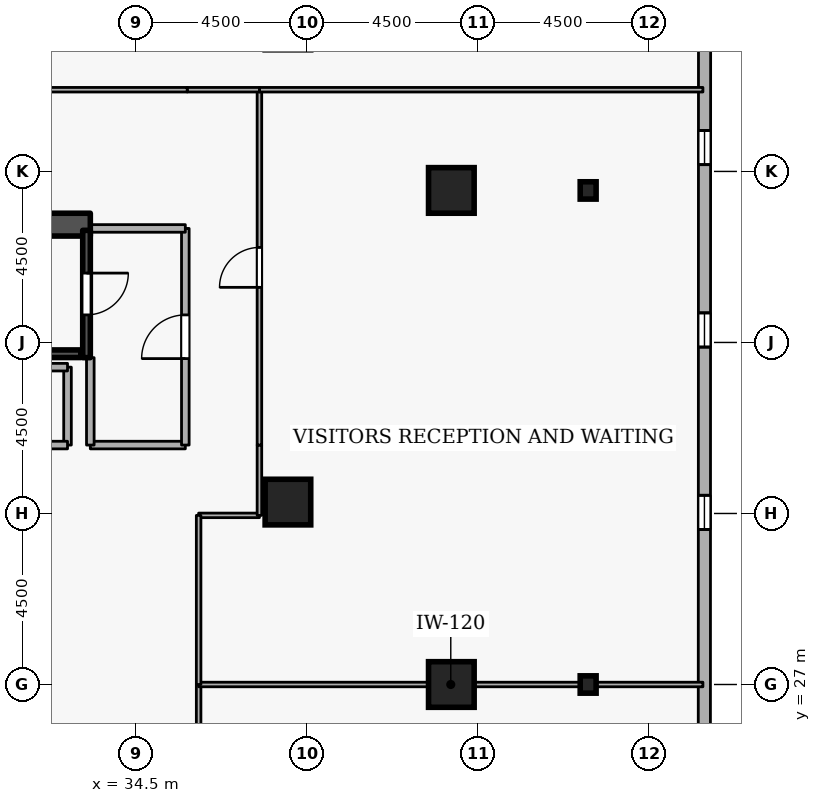
"""IFC4 building model, lengths in metres.
Left out: names, types, materials, properties, quantities, classifications, styles, units other than length and angle.
Written with IfcOpenShell. Run it as: python <this file> out.ifc"""

import sys

from ifc_helpers import new_model, si_unit, direction, frame, frame_2d, origin, origin_2d, place, context, subcontext, project, spatial, rectangle, i_section, extrude, element, fill, save


model = new_model("IFC4")
c1 = context("Model", 3, precision=1e-05, world=origin(), true_north=direction((0.0, 1.0)))
c2 = subcontext(c1, "Body", "Model", "MODEL_VIEW")
j1 = project(units=[si_unit("LENGTHUNIT", "METRE"), si_unit("PLANEANGLEUNIT", "RADIAN")], contexts=[c1])
p1 = place(None, origin())
s1 = spatial("IfcSite", under=j1, at=p1, CompositionType="ELEMENT")
p2 = place(p1, origin())
s2 = spatial("IfcBuilding", under=s1, at=p2, CompositionType="ELEMENT")
p3 = place(p2, frame((0.0, 0.0, 80.1)))
s3 = spatial("IfcBuildingStorey", under=s2, at=p3, CompositionType="ELEMENT", Elevation=80.1)
p4 = place(p3, frame((17.7, 39.1, 0.0), z_axis=(0.0, 0.0, 1.0), x_axis=(1.0, 0.0, 0.0)))
e1 = element("IfcWall", 1, at=p4, inside=s3, PredefinedType="SHEAR", context=c2, shape_type="SweptSolid", body=[
    extrude(rectangle(XDim=15.6, YDim=0.6, at=frame_2d((7.8, 0.0))), origin(), (0.0, 0.0, 1.0), 3.6),
])
for number, where, z_axis, x_axis in (
    (2, (42.8, 27.0, 0.0), (0.0, 0.0, 1.0), (1.0, 0.0, 0.0)),
    (3, (42.8, 40.0, 0.0), (0.0, 0.0, 1.0), (1.0, 0.0, 0.0)),
    (4, (38.5, 31.8, 0.0), (0.0, 0.0, 1.0), (1.0, 0.0, 0.0)),
):
    element("IfcColumn", number, at=place(p3, frame(where, z_axis=z_axis, x_axis=x_axis)), inside=s3, PredefinedType="COLUMN", context=c2, shape_type="SweptSolid", body=[
        extrude(rectangle(XDim=1.2, YDim=1.2, at=origin_2d()), origin(), (0.0, 0.0, 1.0), 3.6),
    ])
for number, where, z_axis, x_axis in (
    (5, (46.4, 27.0, 0.0), (0.0, 0.0, 1.0), (1.0, 0.0, 0.0)),
    (6, (46.4, 40.0, 0.0), (0.0, 0.0, 1.0), (1.0, 0.0, 0.0)),
):
    element("IfcColumn", number, at=place(p3, frame(where, z_axis=z_axis, x_axis=x_axis)), inside=s3, PredefinedType="COLUMN", context=c2, shape_type="SweptSolid", body=[
        extrude(i_section(OverallWidth=0.418, OverallDepth=0.456, WebThickness=0.042, FlangeThickness=0.067, FilletRadius=0.015, at=origin_2d()), origin(), (0.0, 0.0, 1.0), 3.6),
    ])
p5 = place(p3, frame((49.454, 14.878, 0.0), z_axis=(0.0, 0.0, 1.0), x_axis=(0.000313347115, 0.999999950907, 0.0)))
e7 = element("IfcWall", 7, at=p5, inside=s3, PredefinedType="STANDARD", context=c2, shape_type="SweptSolid", body=[
    extrude(rectangle(XDim=33.503, YDim=0.32, at=frame_2d((16.751, 0.0))), origin(), (0.0, 0.0, 1.0), 2.7),
])
p6 = place(p5, frame((1.8, 0.0, 0.72)))
e8 = element("IfcOpeningElement", 8, at=p6, cuts=e7, PredefinedType="OPENING", context=c2, shape_type="SweptSolid", body=[
    extrude(rectangle(XDim=0.9, YDim=1.75, at=frame_2d((0.45, 0.875))), frame((0.0, 0.17, 0.0), z_axis=(0.0, -1.0, 0.0), x_axis=(1.0, 0.0, 0.0)), (0.0, 0.0, 1.0), 0.34),
])
p7 = place(p5, frame((6.6, 0.0, 0.72)))
e9 = element("IfcOpeningElement", 9, at=p7, cuts=e7, PredefinedType="OPENING", context=c2, shape_type="SweptSolid", body=[
    extrude(rectangle(XDim=0.9, YDim=1.75, at=frame_2d((0.45, 0.875))), frame((0.0, 0.17, 0.0), z_axis=(0.0, -1.0, 0.0), x_axis=(1.0, 0.0, 0.0)), (0.0, 0.0, 1.0), 0.34),
])
p8 = place(p5, frame((16.2, 0.0, 0.72)))
e10 = element("IfcOpeningElement", 10, at=p8, cuts=e7, PredefinedType="OPENING", context=c2, shape_type="SweptSolid", body=[
    extrude(rectangle(XDim=0.9, YDim=1.75, at=frame_2d((0.45, 0.875))), frame((0.0, 0.17, 0.0), z_axis=(0.0, -1.0, 0.0), x_axis=(1.0, 0.0, 0.0)), (0.0, 0.0, 1.0), 0.34),
])
p9 = place(p5, frame((21.0, 0.0, 0.72)))
e11 = element("IfcOpeningElement", 11, at=p9, cuts=e7, PredefinedType="OPENING", context=c2, shape_type="SweptSolid", body=[
    extrude(rectangle(XDim=0.9, YDim=1.75, at=frame_2d((0.45, 0.875))), frame((0.0, 0.17, 0.0), z_axis=(0.0, -1.0, 0.0), x_axis=(1.0, 0.0, 0.0)), (0.0, 0.0, 1.0), 0.34),
])
p10 = place(p5, frame((25.8, 0.0, 0.72)))
e12 = element("IfcOpeningElement", 12, at=p10, cuts=e7, PredefinedType="OPENING", context=c2, shape_type="SweptSolid", body=[
    extrude(rectangle(XDim=0.9, YDim=1.75, at=frame_2d((0.45, 0.875))), frame((0.0, 0.17, 0.0), z_axis=(0.0, -1.0, 0.0), x_axis=(1.0, 0.0, 0.0)), (0.0, 0.0, 1.0), 0.34),
])
p11 = place(p5, frame((30.6, 0.0, 0.72)))
e13 = element("IfcOpeningElement", 13, at=p11, cuts=e7, PredefinedType="OPENING", context=c2, shape_type="SweptSolid", body=[
    extrude(rectangle(XDim=0.9, YDim=1.75, at=frame_2d((0.45, 0.875))), frame((0.0, 0.17, 0.0), z_axis=(0.0, -1.0, 0.0), x_axis=(1.0, 0.0, 0.0)), (0.0, 0.0, 1.0), 0.34),
])
p12 = place(p3, frame((33.2, 38.95, 0.0), z_axis=(0.0, 0.0, 1.0), x_axis=(0.0, -1.0, 0.0)))
e14 = element("IfcWall", 14, at=p12, inside=s3, PredefinedType="SHEAR", context=c2, shape_type="SweptSolid", body=[
    extrude(rectangle(XDim=3.35, YDim=0.2, at=frame_2d((1.675, 0.0))), origin(), (0.0, 0.0, 1.0), 3.6),
])
p13 = place(p12, frame((1.125, 0.0, 0.0)))
e15 = element("IfcOpeningElement", 15, at=p13, cuts=e14, PredefinedType="OPENING", context=c2, shape_type="SweptSolid", body=[
    extrude(rectangle(XDim=1.1, YDim=2.1, at=frame_2d((0.55, 1.05))), frame((0.0, 0.11, 0.0), z_axis=(0.0, -1.0, 0.0), x_axis=(1.0, 0.0, 0.0)), (0.0, 0.0, 1.0), 0.22),
])
p14 = place(p3, frame((25.95, 35.703, 0.0), z_axis=(0.0, 0.0, 1.0), x_axis=(1.0, 0.0, 0.0)))
e16 = element("IfcWall", 16, at=p14, inside=s3, PredefinedType="SHEAR", context=c2, shape_type="SweptSolid", body=[
    extrude(rectangle(XDim=7.1, YDim=0.2, at=frame_2d((3.55, 0.0))), origin(), (0.0, 0.0, 1.0), 3.6),
])
p15 = place(p3, frame((33.3, 33.3, 0.0), z_axis=(0.0, 0.0, 1.0), x_axis=(1.0, 0.0, 0.0)))
e17 = element("IfcWall", 17, at=p15, inside=s3, PredefinedType="STANDARD", context=c2, shape_type="SweptSolid", body=[
    extrude(rectangle(XDim=2.5, YDim=0.2, at=frame_2d((1.25, 0.0))), origin(), (0.0, 0.0, 1.0), 3.34),
])
p16 = place(p3, frame((35.8, 33.3, 0.0), z_axis=(0.0, 0.0, 1.0), x_axis=(0.0, 1.0, 0.0)))
e18 = element("IfcWall", 18, at=p16, inside=s3, PredefinedType="STANDARD", context=c2, shape_type="SweptSolid", body=[
    extrude(rectangle(XDim=5.7, YDim=0.2, at=frame_2d((2.85, 0.0))), origin(), (0.0, 0.0, 1.0), 3.34),
])
p17 = place(p16, frame((2.275, 0.0, 0.0)))
e19 = element("IfcOpeningElement", 19, at=p17, cuts=e18, PredefinedType="OPENING", context=c2, shape_type="SweptSolid", body=[
    extrude(rectangle(XDim=1.15, YDim=2.1, at=frame_2d((0.575, 1.05))), frame((0.0, 0.11, 0.0), z_axis=(0.0, -1.0, 0.0), x_axis=(1.0, 0.0, 0.0)), (0.0, 0.0, 1.0), 0.22),
])
p18 = place(p3, frame((35.8, 39.0, 0.0), z_axis=(0.0, 0.0, 1.0), x_axis=(-1.0, 0.0, 0.0)))
e20 = element("IfcWall", 20, at=p18, inside=s3, PredefinedType="STANDARD", context=c2, shape_type="SweptSolid", body=[
    extrude(rectangle(XDim=2.5, YDim=0.2, at=frame_2d((1.25, 0.0))), origin(), (0.0, 0.0, 1.0), 3.34),
])
p19 = place(p3, frame((33.3, 35.6, 0.0), z_axis=(0.0, 0.0, 1.0), x_axis=(0.0, -1.0, 0.0)))
e21 = element("IfcWall", 21, at=p19, inside=s3, PredefinedType="STANDARD", context=c2, shape_type="SweptSolid", body=[
    extrude(rectangle(XDim=2.3, YDim=0.2, at=frame_2d((1.15, 0.0))), origin(), (0.0, 0.0, 1.0), 2.545),
])
p20 = place(p3, frame((32.7, 35.35, 0.0), z_axis=(0.0, 0.0, 1.0), x_axis=(0.0, -1.0, 0.0)))
e22 = element("IfcWall", 22, at=p20, inside=s3, PredefinedType="STANDARD", context=c2, shape_type="SweptSolid", body=[
    extrude(rectangle(XDim=2.05, YDim=0.2, at=frame_2d((1.025, 0.0))), origin(), (0.0, 0.0, 1.0), 2.545),
])
p21 = place(p3, frame((32.7, 33.3, 0.0), z_axis=(0.0, 0.0, 1.0), x_axis=(-1.0, 0.0, 0.0)))
e23 = element("IfcWall", 23, at=p21, inside=s3, PredefinedType="STANDARD", context=c2, shape_type="SweptSolid", body=[
    extrude(rectangle(XDim=2.35, YDim=0.2, at=frame_2d((1.175, 0.0))), origin(), (0.0, 0.0, 1.0), 3.34),
])
p22 = place(p21, frame((0.6, 0.0, 0.0)))
e24 = element("IfcOpeningElement", 24, at=p22, cuts=e23, PredefinedType="OPENING", context=c2, shape_type="SweptSolid", body=[
    extrude(rectangle(XDim=1.15, YDim=2.1, at=frame_2d((0.575, 1.05))), frame((0.0, 0.11, 0.0), z_axis=(0.0, -1.0, 0.0), x_axis=(1.0, 0.0, 0.0)), (0.0, 0.0, 1.0), 0.22),
])
p23 = place(p3, frame((30.35, 35.35, 0.0), z_axis=(0.0, 0.0, 1.0), x_axis=(1.0, 0.0, 0.0)))
e25 = element("IfcWall", 25, at=p23, inside=s3, PredefinedType="STANDARD", context=c2, shape_type="SweptSolid", body=[
    extrude(rectangle(XDim=2.35, YDim=0.2, at=frame_2d((1.175, 0.0))), origin(), (0.0, 0.0, 1.0), 3.34),
])
p24 = place(p3, frame((36.15, 22.55, 0.0), z_axis=(0.0, 0.0, 1.0), x_axis=(0.0, 1.0, 0.0)))
e26 = element("IfcWall", 26, at=p24, inside=s3, PredefinedType="PARTITIONING", context=c2, shape_type="SweptSolid", body=[
    extrude(rectangle(XDim=4.45, YDim=0.12, at=frame_2d((2.225, 0.0))), origin(), (0.0, 0.0, 1.0), 3.34),
])
p25 = place(p24, frame((1.7, 0.0, 0.0)))
e27 = element("IfcOpeningElement", 27, at=p25, cuts=e26, PredefinedType="OPENING", context=c2, shape_type="SweptSolid", body=[
    extrude(rectangle(XDim=1.05, YDim=2.1, at=frame_2d((0.525, 1.05))), frame((0.0, 0.07, 0.0), z_axis=(0.0, -1.0, 0.0), x_axis=(1.0, 0.0, 0.0)), (0.0, 0.0, 1.0), 0.14),
])
p26 = place(p3, frame((36.15, 27.0, 0.0), z_axis=(0.0, 0.0, 1.0), x_axis=(1.0, 0.0, 0.0)))
e28 = element("IfcWall", 28, at=p26, inside=s3, PredefinedType="PARTITIONING", context=c2, shape_type="SweptSolid", body=[
    extrude(rectangle(XDim=13.27, YDim=0.12, at=frame_2d((6.635, 0.0))), origin(), (0.0, 0.0, 1.0), 2.882),
])
p27 = place(p3, frame((36.15, 31.45, 0.0), z_axis=(0.0, 0.0, 1.0), x_axis=(1.0, 0.0, 0.0)))
e29 = element("IfcWall", 29, at=p27, inside=s3, PredefinedType="PARTITIONING", context=c2, shape_type="SweptSolid", body=[
    extrude(rectangle(XDim=1.6, YDim=0.12, at=frame_2d((0.8, 0.0))), origin(), (0.0, 0.0, 1.0), 3.34),
])
p28 = place(p3, frame((37.75, 31.45, 0.0), z_axis=(0.0, 0.0, 1.0), x_axis=(0.0, 1.0, 0.0)))
e30 = element("IfcWall", 30, at=p28, inside=s3, PredefinedType="PARTITIONING", context=c2, shape_type="SweptSolid", body=[
    extrude(rectangle(XDim=1.85, YDim=0.12, at=frame_2d((0.925, 0.0))), origin(), (0.0, 0.0, 1.0), 3.34),
])
p29 = place(p3, frame((37.75, 33.3, 0.0), z_axis=(0.0, 0.0, 1.0), x_axis=(0.0, 1.0, 0.0)))
e31 = element("IfcWall", 31, at=p29, inside=s3, PredefinedType="PARTITIONING", context=c2, shape_type="SweptSolid", body=[
    extrude(rectangle(XDim=9.35, YDim=0.12, at=frame_2d((4.675, 0.0))), origin(), (0.0, 0.0, 1.0), 3.34),
])
p30 = place(p29, frame((4.15, 0.0, 0.0)))
e32 = element("IfcOpeningElement", 32, at=p30, cuts=e31, PredefinedType="OPENING", context=c2, shape_type="SweptSolid", body=[
    extrude(rectangle(XDim=1.05, YDim=2.1, at=frame_2d((0.525, 1.05))), frame((0.0, 0.07, 0.0), z_axis=(0.0, -1.0, 0.0), x_axis=(1.0, 0.0, 0.0)), (0.0, 0.0, 1.0), 0.14),
])
p31 = place(p3, frame((37.75, 42.65, 0.0), z_axis=(0.0, 0.0, 1.0), x_axis=(1.0, 0.0, 0.0)))
e33 = element("IfcWall", 33, at=p31, inside=s3, PredefinedType="PARTITIONING", context=c2, shape_type="SweptSolid", body=[
    extrude(rectangle(XDim=11.67, YDim=0.12, at=frame_2d((5.835, 0.0))), origin(), (0.0, 0.0, 1.0), 3.34),
])
p32 = place(p3, frame((36.15, 27.0, 0.0), z_axis=(0.0, 0.0, 1.0), x_axis=(0.0, 1.0, 0.0)))
e34 = element("IfcWall", 34, at=p32, inside=s3, PredefinedType="PARTITIONING", context=c2, shape_type="SweptSolid", body=[
    extrude(rectangle(XDim=4.45, YDim=0.12, at=frame_2d((2.225, 0.0))), origin(), (0.0, 0.0, 1.0), 3.34),
])
p33 = place(p3, frame((37.75, 42.65, 0.0), z_axis=(0.0, 0.0, 1.0), x_axis=(-1.0, 0.0, 0.0)))
e35 = element("IfcWall", 35, at=p33, inside=s3, PredefinedType="PARTITIONING", context=c2, shape_type="SweptSolid", body=[
    extrude(rectangle(XDim=1.9, YDim=0.12, at=frame_2d((0.95, 0.0))), origin(), (0.0, 0.0, 1.0), 2.895),
])
p34 = place(p3, frame((35.85, 42.65, 0.0), z_axis=(0.0, 0.0, 1.0), x_axis=(-1.0, 0.0, 0.0)))
e36 = element("IfcWall", 36, at=p34, inside=s3, PredefinedType="PARTITIONING", context=c2, shape_type="SweptSolid", body=[
    extrude(rectangle(XDim=10.35, YDim=0.12, at=frame_2d((5.175, 0.0))), origin(), (0.0, 0.0, 1.0), 2.895),
])
p35 = place(p34, frame((4.65, 0.0, 0.0)))
e37 = element("IfcOpeningElement", 37, at=p35, cuts=e36, PredefinedType="OPENING", context=c2, shape_type="SweptSolid", body=[
    extrude(rectangle(XDim=1.05, YDim=2.1, at=frame_2d((0.525, 1.05))), frame((0.0, 0.07, 0.0), z_axis=(0.0, -1.0, 0.0), x_axis=(1.0, 0.0, 0.0)), (0.0, 0.0, 1.0), 0.14),
])
p36 = place(p8, origin())
e38 = element("IfcWindow", 38, at=p36, inside=s3, PartitioningType="SINGLE_PANEL", PredefinedType="WINDOW", context=c2, shape_type="SweptSolid", body=[
    extrude(rectangle(XDim=0.9, YDim=1.75, at=frame_2d((0.45, 0.875))), frame((0.0, 0.03, 0.0), z_axis=(0.0, -1.0, 0.0), x_axis=(1.0, 0.0, 0.0)), (0.0, 0.0, 1.0), 0.06),
])
fill(e10, e38)
p37 = place(p9, origin())
e39 = element("IfcWindow", 39, at=p37, inside=s3, PartitioningType="SINGLE_PANEL", PredefinedType="WINDOW", context=c2, shape_type="SweptSolid", body=[
    extrude(rectangle(XDim=0.9, YDim=1.75, at=frame_2d((0.45, 0.875))), frame((0.0, 0.03, 0.0), z_axis=(0.0, -1.0, 0.0), x_axis=(1.0, 0.0, 0.0)), (0.0, 0.0, 1.0), 0.06),
])
fill(e11, e39)
p38 = place(p10, origin())
e40 = element("IfcWindow", 40, at=p38, inside=s3, PartitioningType="SINGLE_PANEL", PredefinedType="WINDOW", context=c2, shape_type="SweptSolid", body=[
    extrude(rectangle(XDim=0.9, YDim=1.75, at=frame_2d((0.45, 0.875))), frame((0.0, 0.03, 0.0), z_axis=(0.0, -1.0, 0.0), x_axis=(1.0, 0.0, 0.0)), (0.0, 0.0, 1.0), 0.06),
])
fill(e12, e40)
p39 = place(p13, origin())
e41 = element("IfcDoor", 41, at=p39, inside=s3, OperationType="SINGLE_SWING_LEFT", PredefinedType="DOOR", context=c2, shape_type="SweptSolid", body=[
    extrude(rectangle(XDim=1.1, YDim=2.1, at=frame_2d((0.55, 1.05))), frame((0.0, 0.025, 0.0), z_axis=(0.0, -1.0, 0.0), x_axis=(1.0, 0.0, 0.0)), (0.0, 0.0, 1.0), 0.05),
])
fill(e15, e41)
p40 = place(p17, origin())
e42 = element("IfcDoor", 42, at=p40, inside=s3, OperationType="SINGLE_SWING_LEFT", PredefinedType="DOOR", context=c2, shape_type="SweptSolid", body=[
    extrude(rectangle(XDim=1.15, YDim=2.1, at=frame_2d((0.575, 1.05))), frame((0.0, 0.025, 0.0), z_axis=(0.0, -1.0, 0.0), x_axis=(1.0, 0.0, 0.0)), (0.0, 0.0, 1.0), 0.05),
])
fill(e19, e42)
p41 = place(p30, origin())
e43 = element("IfcDoor", 43, at=p41, inside=s3, OperationType="SINGLE_SWING_LEFT", PredefinedType="DOOR", context=c2, shape_type="SweptSolid", body=[
    extrude(rectangle(XDim=1.05, YDim=2.1, at=frame_2d((0.525, 1.05))), frame((0.0, 0.025, 0.0), z_axis=(0.0, -1.0, 0.0), x_axis=(1.0, 0.0, 0.0)), (0.0, 0.0, 1.0), 0.05),
])
fill(e32, e43)
save(model, sys.argv[1])
